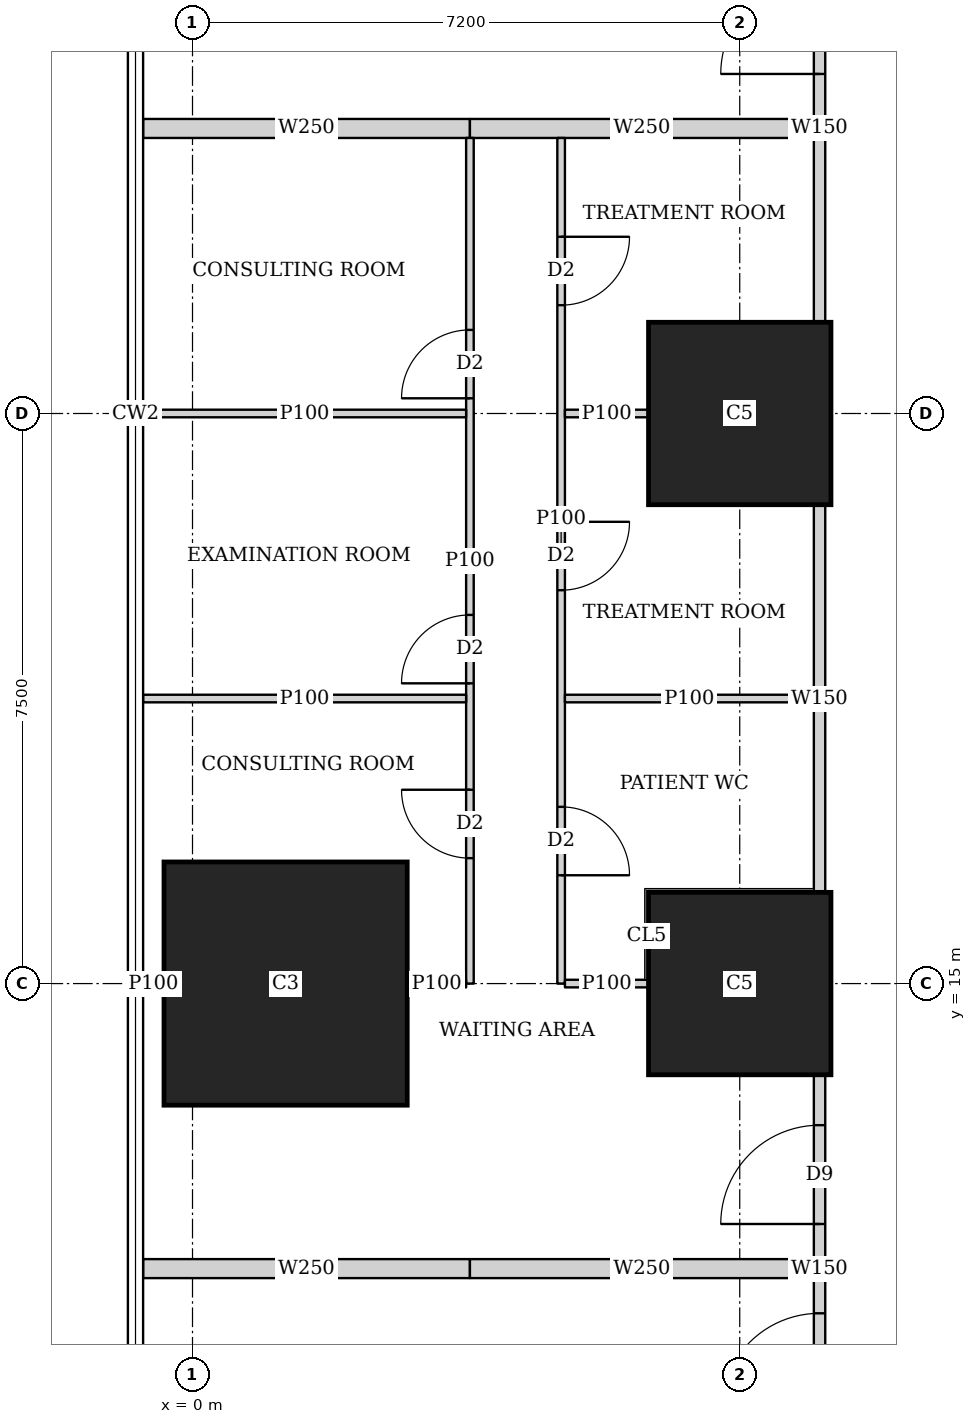
"""IFC4 building model, lengths in metres.
Left out: names, types, materials, properties, quantities, classifications, styles, units other than length and angle.
Written with IfcOpenShell. Run it as: python <this file> out.ifc"""

import sys

from ifc_helpers import new_model, si_unit, direction, frame, frame_2d, origin, origin_2d, place, context, subcontext, project, spatial, rectangle, extrude, element, fill, save


model = new_model("IFC4")
c1 = context("Model", 3, precision=1e-05, world=origin(), true_north=direction((0.0, 1.0)))
c2 = subcontext(c1, "Body", "Model", "MODEL_VIEW")
j1 = project(units=[si_unit("LENGTHUNIT", "METRE"), si_unit("PLANEANGLEUNIT", "RADIAN")], contexts=[c1])
p1 = place(None, origin())
s1 = spatial("IfcSite", under=j1, at=p1, CompositionType="ELEMENT")
p2 = place(p1, origin())
s2 = spatial("IfcBuilding", under=s1, at=p2, CompositionType="ELEMENT")
p3 = place(p2, frame((0.0, 0.0, 5.6)))
s3 = spatial("IfcBuildingStorey", under=s2, at=p3, CompositionType="ELEMENT", Elevation=5.6)
p4 = place(p3, frame((1.225, 15.0, 0.0), z_axis=(0.0, 0.0, 1.0), x_axis=(1.0, 0.0, 0.0)))
e1 = element("IfcColumn", 1, at=p4, inside=s3, PredefinedType="COLUMN", context=c2, shape_type="SweptSolid", body=[
    extrude(rectangle(XDim=3.2, YDim=3.2, at=origin_2d()), origin(), (0.0, 0.0, 1.0), 4.5),
])
for number, where, z_axis, x_axis in (
    (2, (7.2, 15.0, 0.0), (0.0, 0.0, 1.0), (1.0, 0.0, 0.0)),
    (3, (7.2, 22.5, 0.0), (0.0, 0.0, 1.0), (1.0, 0.0, 0.0)),
):
    element("IfcColumn", number, at=place(p3, frame(where, z_axis=z_axis, x_axis=x_axis)), inside=s3, PredefinedType="COLUMN", context=c2, shape_type="SweptSolid", body=[
        extrude(rectangle(XDim=2.4, YDim=2.4, at=origin_2d()), origin(), (0.0, 0.0, 1.0), 4.5),
    ])
p5 = place(p3, frame((8.25, 8.701, 0.0), z_axis=(0.0, 0.0, 1.0), x_axis=(0.0, 1.0, 0.0)))
e4 = element("IfcWall", 4, at=p5, inside=s3, PredefinedType="SOLIDWALL", context=c2, shape_type="SweptSolid", body=[
    extrude(rectangle(XDim=5.098, YDim=0.15, at=frame_2d((2.549, 0.0))), origin(), (0.0, 0.0, 1.0), 4.2),
])
p6 = place(p5, frame((0.661, 0.0, 0.0)))
e5 = element("IfcOpeningElement", 5, at=p6, cuts=e4, PredefinedType="OPENING", context=c2, shape_type="SweptSolid", body=[
    extrude(rectangle(XDim=1.3, YDim=2.1, at=frame_2d((0.65, 1.05))), frame((0.0, 0.085, 0.0), z_axis=(0.0, -1.0, 0.0), x_axis=(1.0, 0.0, 0.0)), (0.0, 0.0, 1.0), 0.17),
])
p7 = place(p5, frame((3.136, 0.0, 0.0)))
e6 = element("IfcOpeningElement", 6, at=p7, cuts=e4, PredefinedType="OPENING", context=c2, shape_type="SweptSolid", body=[
    extrude(rectangle(XDim=1.3, YDim=2.1, at=frame_2d((0.65, 1.05))), frame((0.0, 0.085, 0.0), z_axis=(0.0, -1.0, 0.0), x_axis=(1.0, 0.0, 0.0)), (0.0, 0.0, 1.0), 0.17),
])
p8 = place(p3, frame((8.25, 16.201, 0.0), z_axis=(0.0, 0.0, 1.0), x_axis=(0.0, 1.0, 0.0)))
e7 = element("IfcWall", 7, at=p8, inside=s3, PredefinedType="SOLIDWALL", context=c2, shape_type="SweptSolid", body=[
    extrude(rectangle(XDim=5.098, YDim=0.15, at=frame_2d((2.549, 0.0))), origin(), (0.0, 0.0, 1.0), 4.2),
])
p9 = place(p3, frame((8.25, 23.701, 0.0), z_axis=(0.0, 0.0, 1.0), x_axis=(0.0, 1.0, 0.0)))
e8 = element("IfcWall", 8, at=p9, inside=s3, PredefinedType="SOLIDWALL", context=c2, shape_type="SweptSolid", body=[
    extrude(rectangle(XDim=5.098, YDim=0.15, at=frame_2d((2.549, 0.0))), origin(), (0.0, 0.0, 1.0), 4.2),
])
p10 = place(p9, frame((3.266, 0.0, 0.0)))
e9 = element("IfcOpeningElement", 9, at=p10, cuts=e8, PredefinedType="OPENING", context=c2, shape_type="SweptSolid", body=[
    extrude(rectangle(XDim=1.3, YDim=2.1, at=frame_2d((0.65, 1.05))), frame((0.0, 0.085, 0.0), z_axis=(0.0, -1.0, 0.0), x_axis=(1.0, 0.0, 0.0)), (0.0, 0.0, 1.0), 0.17),
])
p11 = place(p3, frame((3.65, 15.0, 0.0), z_axis=(0.0, 0.0, 1.0), x_axis=(0.0, 1.0, 0.0)))
e10 = element("IfcWall", 10, at=p11, inside=s3, PredefinedType="PARTITIONING", context=c2, shape_type="SweptSolid", body=[
    extrude(rectangle(XDim=11.125, YDim=0.1, at=frame_2d((5.562, 0.0))), origin(), (0.0, 0.0, 1.0), 2.6),
])
p12 = place(p11, frame((1.65, 0.0, 0.0)))
e11 = element("IfcOpeningElement", 11, at=p12, cuts=e10, PredefinedType="OPENING", context=c2, shape_type="SweptSolid", body=[
    extrude(rectangle(XDim=0.9, YDim=2.1, at=frame_2d((0.45, 1.05))), frame((0.0, 0.06, 0.0), z_axis=(0.0, -1.0, 0.0), x_axis=(1.0, 0.0, 0.0)), (0.0, 0.0, 1.0), 0.12),
])
p13 = place(p11, frame((3.95, 0.0, 0.0)))
e12 = element("IfcOpeningElement", 12, at=p13, cuts=e10, PredefinedType="OPENING", context=c2, shape_type="SweptSolid", body=[
    extrude(rectangle(XDim=0.9, YDim=2.1, at=frame_2d((0.45, 1.05))), frame((0.0, 0.06, 0.0), z_axis=(0.0, -1.0, 0.0), x_axis=(1.0, 0.0, 0.0)), (0.0, 0.0, 1.0), 0.12),
])
p14 = place(p11, frame((7.7, 0.0, 0.0)))
e13 = element("IfcOpeningElement", 13, at=p14, cuts=e10, PredefinedType="OPENING", context=c2, shape_type="SweptSolid", body=[
    extrude(rectangle(XDim=0.9, YDim=2.1, at=frame_2d((0.45, 1.05))), frame((0.0, 0.06, 0.0), z_axis=(0.0, -1.0, 0.0), x_axis=(1.0, 0.0, 0.0)), (0.0, 0.0, 1.0), 0.12),
])
p15 = place(p3, frame((4.85, 15.0, 0.0), z_axis=(0.0, 0.0, 1.0), x_axis=(0.0, 1.0, 0.0)))
e14 = element("IfcWall", 14, at=p15, inside=s3, PredefinedType="PARTITIONING", context=c2, shape_type="SweptSolid", body=[
    extrude(rectangle(XDim=11.125, YDim=0.1, at=frame_2d((5.562, 0.0))), origin(), (0.0, 0.0, 1.0), 2.6),
])
p16 = place(p15, frame((1.425, 0.0, 0.0)))
e15 = element("IfcOpeningElement", 15, at=p16, cuts=e14, PredefinedType="OPENING", context=c2, shape_type="SweptSolid", body=[
    extrude(rectangle(XDim=0.9, YDim=2.1, at=frame_2d((0.45, 1.05))), frame((0.0, 0.06, 0.0), z_axis=(0.0, -1.0, 0.0), x_axis=(1.0, 0.0, 0.0)), (0.0, 0.0, 1.0), 0.12),
])
p17 = place(p15, frame((5.175, 0.0, 0.0)))
e16 = element("IfcOpeningElement", 16, at=p17, cuts=e14, PredefinedType="OPENING", context=c2, shape_type="SweptSolid", body=[
    extrude(rectangle(XDim=0.9, YDim=2.1, at=frame_2d((0.45, 1.05))), frame((0.0, 0.06, 0.0), z_axis=(0.0, -1.0, 0.0), x_axis=(1.0, 0.0, 0.0)), (0.0, 0.0, 1.0), 0.12),
])
p18 = place(p15, frame((8.925, 0.0, 0.0)))
e17 = element("IfcOpeningElement", 17, at=p18, cuts=e14, PredefinedType="OPENING", context=c2, shape_type="SweptSolid", body=[
    extrude(rectangle(XDim=0.9, YDim=2.1, at=frame_2d((0.45, 1.05))), frame((0.0, 0.06, 0.0), z_axis=(0.0, -1.0, 0.0), x_axis=(1.0, 0.0, 0.0)), (0.0, 0.0, 1.0), 0.12),
])
p19 = place(p3, frame((-0.65, 15.0, 0.0), z_axis=(0.0, 0.0, 1.0), x_axis=(1.0, 0.0, 0.0)))
e18 = element("IfcWall", 18, at=p19, inside=s3, PredefinedType="PARTITIONING", context=c2, shape_type="SweptSolid", body=[
    extrude(rectangle(XDim=0.274, YDim=0.1, at=frame_2d((0.137, 0.0))), origin(), (0.0, 0.0, 1.0), 4.2),
])
p20 = place(p3, frame((2.826, 15.0, 0.0), z_axis=(0.0, 0.0, 1.0), x_axis=(1.0, 0.0, 0.0)))
e19 = element("IfcWall", 19, at=p20, inside=s3, PredefinedType="PARTITIONING", context=c2, shape_type="SweptSolid", body=[
    extrude(rectangle(XDim=0.774, YDim=0.1, at=frame_2d((0.387, 0.0))), origin(), (0.0, 0.0, 1.0), 2.6),
])
for number, where, z_axis, x_axis in (
    (20, (-0.65, 18.75, 0.0), (0.0, 0.0, 1.0), (1.0, 0.0, 0.0)),
    (21, (-0.65, 22.5, 0.0), (0.0, 0.0, 1.0), (1.0, 0.0, 0.0)),
):
    element("IfcWall", number, at=place(p3, frame(where, z_axis=z_axis, x_axis=x_axis)), inside=s3, PredefinedType="PARTITIONING", context=c2, shape_type="SweptSolid", body=[
        extrude(rectangle(XDim=4.25, YDim=0.1, at=frame_2d((2.125, 0.0))), origin(), (0.0, 0.0, 1.0), 2.4),
    ])
p21 = place(p3, frame((4.9, 15.0, 0.0), z_axis=(0.0, 0.0, 1.0), x_axis=(1.0, 0.0, 0.0)))
e22 = element("IfcWall", 22, at=p21, inside=s3, PredefinedType="PARTITIONING", context=c2, shape_type="SweptSolid", body=[
    extrude(rectangle(XDim=1.099, YDim=0.1, at=frame_2d((0.55, 0.0))), origin(), (0.0, 0.0, 1.0), 2.6),
])
p22 = place(p3, frame((4.9, 18.75, 0.0), z_axis=(0.0, 0.0, 1.0), x_axis=(1.0, 0.0, 0.0)))
e23 = element("IfcWall", 23, at=p22, inside=s3, PredefinedType="PARTITIONING", context=c2, shape_type="SweptSolid", body=[
    extrude(rectangle(XDim=3.275, YDim=0.1, at=frame_2d((1.638, 0.0))), origin(), (0.0, 0.0, 1.0), 2.6),
])
p23 = place(p3, frame((4.9, 22.5, 0.0), z_axis=(0.0, 0.0, 1.0), x_axis=(1.0, 0.0, 0.0)))
e24 = element("IfcWall", 24, at=p23, inside=s3, PredefinedType="PARTITIONING", context=c2, shape_type="SweptSolid", body=[
    extrude(rectangle(XDim=1.099, YDim=0.1, at=frame_2d((0.55, 0.0))), origin(), (0.0, 0.0, 1.0), 4.2),
])
p24 = place(p3, frame((-0.65, 11.25, 0.0), z_axis=(0.0, 0.0, 1.0), x_axis=(1.0, 0.0, 0.0)))
e25 = element("IfcWall", 25, at=p24, inside=s3, PredefinedType="SOLIDWALL", context=c2, shape_type="SweptSolid", body=[
    extrude(rectangle(XDim=4.3, YDim=0.25, at=frame_2d((2.15, 0.0))), origin(), (0.0, 0.0, 1.0), 2.4),
])
p25 = place(p3, frame((3.65, 11.25, 0.0), z_axis=(0.0, 0.0, 1.0), x_axis=(1.0, 0.0, 0.0)))
e26 = element("IfcWall", 26, at=p25, inside=s3, PredefinedType="SOLIDWALL", context=c2, shape_type="SweptSolid", body=[
    extrude(rectangle(XDim=4.525, YDim=0.25, at=frame_2d((2.263, 0.0))), origin(), (0.0, 0.0, 1.0), 2.6),
])
p26 = place(p3, frame((-0.65, 26.25, 0.0), z_axis=(0.0, 0.0, 1.0), x_axis=(1.0, 0.0, 0.0)))
e27 = element("IfcWall", 27, at=p26, inside=s3, PredefinedType="SOLIDWALL", context=c2, shape_type="SweptSolid", body=[
    extrude(rectangle(XDim=4.3, YDim=0.25, at=frame_2d((2.15, 0.0))), origin(), (0.0, 0.0, 1.0), 2.4),
])
p27 = place(p3, frame((3.65, 26.25, 0.0), z_axis=(0.0, 0.0, 1.0), x_axis=(1.0, 0.0, 0.0)))
e28 = element("IfcWall", 28, at=p27, inside=s3, PredefinedType="SOLIDWALL", context=c2, shape_type="SweptSolid", body=[
    extrude(rectangle(XDim=4.525, YDim=0.25, at=frame_2d((2.263, 0.0))), origin(), (0.0, 0.0, 1.0), 2.6),
])
p28 = place(p6, origin())
e29 = element("IfcDoor", 29, at=p28, inside=s3, OperationType="DOUBLE_DOOR_SINGLE_SWING", PredefinedType="DOOR", context=c2, shape_type="SweptSolid", body=[
    extrude(rectangle(XDim=1.3, YDim=2.1, at=frame_2d((0.65, 1.05))), frame((0.0, 0.025, 0.0), z_axis=(0.0, -1.0, 0.0), x_axis=(1.0, 0.0, 0.0)), (0.0, 0.0, 1.0), 0.05),
])
fill(e5, e29)
p29 = place(p12, origin())
e30 = element("IfcDoor", 30, at=p29, inside=s3, OperationType="SINGLE_SWING_RIGHT", PredefinedType="DOOR", context=c2, shape_type="SweptSolid", body=[
    extrude(rectangle(XDim=0.9, YDim=2.1, at=frame_2d((0.45, 1.05))), frame((0.0, 0.025, 0.0), z_axis=(0.0, -1.0, 0.0), x_axis=(1.0, 0.0, 0.0)), (0.0, 0.0, 1.0), 0.05),
])
fill(e11, e30)
p30 = place(p13, origin())
e31 = element("IfcDoor", 31, at=p30, inside=s3, OperationType="SINGLE_SWING_LEFT", PredefinedType="DOOR", context=c2, shape_type="SweptSolid", body=[
    extrude(rectangle(XDim=0.9, YDim=2.1, at=frame_2d((0.45, 1.05))), frame((0.0, 0.025, 0.0), z_axis=(0.0, -1.0, 0.0), x_axis=(1.0, 0.0, 0.0)), (0.0, 0.0, 1.0), 0.05),
])
fill(e12, e31)
p31 = place(p14, origin())
e32 = element("IfcDoor", 32, at=p31, inside=s3, OperationType="SINGLE_SWING_LEFT", PredefinedType="DOOR", context=c2, shape_type="SweptSolid", body=[
    extrude(rectangle(XDim=0.9, YDim=2.1, at=frame_2d((0.45, 1.05))), frame((0.0, 0.025, 0.0), z_axis=(0.0, -1.0, 0.0), x_axis=(1.0, 0.0, 0.0)), (0.0, 0.0, 1.0), 0.05),
])
fill(e13, e32)
p32 = place(p16, origin())
e33 = element("IfcDoor", 33, at=p32, inside=s3, OperationType="SINGLE_SWING_RIGHT", PredefinedType="DOOR", context=c2, shape_type="SweptSolid", body=[
    extrude(rectangle(XDim=0.9, YDim=2.1, at=frame_2d((0.45, 1.05))), frame((0.0, 0.025, 0.0), z_axis=(0.0, -1.0, 0.0), x_axis=(1.0, 0.0, 0.0)), (0.0, 0.0, 1.0), 0.05),
])
fill(e15, e33)
p33 = place(p17, origin())
e34 = element("IfcDoor", 34, at=p33, inside=s3, OperationType="SINGLE_SWING_LEFT", PredefinedType="DOOR", context=c2, shape_type="SweptSolid", body=[
    extrude(rectangle(XDim=0.9, YDim=2.1, at=frame_2d((0.45, 1.05))), frame((0.0, 0.025, 0.0), z_axis=(0.0, -1.0, 0.0), x_axis=(1.0, 0.0, 0.0)), (0.0, 0.0, 1.0), 0.05),
])
fill(e16, e34)
p34 = place(p18, origin())
e35 = element("IfcDoor", 35, at=p34, inside=s3, OperationType="SINGLE_SWING_LEFT", PredefinedType="DOOR", context=c2, shape_type="SweptSolid", body=[
    extrude(rectangle(XDim=0.9, YDim=2.1, at=frame_2d((0.45, 1.05))), frame((0.0, 0.025, 0.0), z_axis=(0.0, -1.0, 0.0), x_axis=(1.0, 0.0, 0.0)), (0.0, 0.0, 1.0), 0.05),
])
fill(e17, e35)
p35 = place(p7, origin())
e36 = element("IfcDoor", 36, at=p35, inside=s3, OperationType="DOUBLE_DOOR_SINGLE_SWING", PredefinedType="DOOR", context=c2, shape_type="SweptSolid", body=[
    extrude(rectangle(XDim=1.3, YDim=2.1, at=frame_2d((0.65, 1.05))), frame((0.0, 0.025, 0.0), z_axis=(0.0, -1.0, 0.0), x_axis=(1.0, 0.0, 0.0)), (0.0, 0.0, 1.0), 0.05),
])
fill(e6, e36)
p36 = place(p10, origin())
e37 = element("IfcDoor", 37, at=p36, inside=s3, OperationType="DOUBLE_DOOR_SINGLE_SWING", PredefinedType="DOOR", context=c2, shape_type="SweptSolid", body=[
    extrude(rectangle(XDim=1.3, YDim=2.1, at=frame_2d((0.65, 1.05))), frame((0.0, 0.025, 0.0), z_axis=(0.0, -1.0, 0.0), x_axis=(1.0, 0.0, 0.0)), (0.0, 0.0, 1.0), 0.05),
])
fill(e9, e37)
save(model, sys.argv[1])
